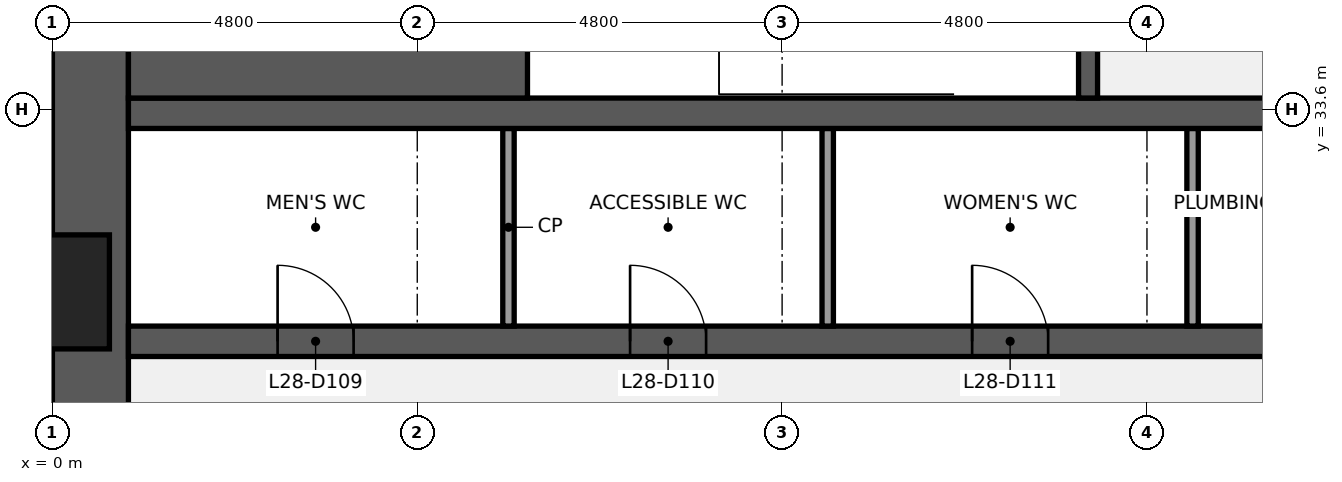
"""IFC4 building model, lengths in metres.
Left out: names, types, materials, properties, quantities, classifications, styles, units other than length and angle.
Written with IfcOpenShell. Run it as: python <this file> out.ifc"""

import sys

from ifc_helpers import new_model, si_unit, direction, frame, frame_2d, origin, place, context, subcontext, project, spatial, rectangle, extrude, element, fill, save


model = new_model("IFC4")
c1 = context("Model", 3, precision=1e-05, world=origin(), true_north=direction((0.0, 1.0)))
c2 = subcontext(c1, "Body", "Model", "MODEL_VIEW")
j1 = project(units=[si_unit("LENGTHUNIT", "METRE"), si_unit("PLANEANGLEUNIT", "RADIAN")], contexts=[c1])
p1 = place(None, origin())
s1 = spatial("IfcSite", under=j1, at=p1, CompositionType="ELEMENT")
p2 = place(p1, origin())
s2 = spatial("IfcBuilding", under=s1, at=p2, CompositionType="ELEMENT")
p3 = place(p2, frame((0.0, 0.0, 132.1)))
s3 = spatial("IfcBuildingStorey", under=s2, at=p3, CompositionType="ELEMENT", Elevation=132.1)
p4 = place(p3, frame((0.5, 9.6, 0.0), z_axis=(0.0, 0.0, 1.0), x_axis=(0.0, 1.0, 0.0)))
e1 = element("IfcWall", 1, at=p4, inside=s3, PredefinedType="SHEAR", context=c2, shape_type="SweptSolid", body=[
    extrude(rectangle(XDim=28.8, YDim=1.0, at=frame_2d((14.4, 0.0))), origin(), (0.0, 0.0, 1.0), 3.84),
])
p5 = place(p4, frame((8.85, 0.0, 0.9)))
e2 = element("IfcOpeningElement", 2, at=p5, cuts=e1, PredefinedType="OPENING", context=c2, shape_type="SweptSolid", body=[
    extrude(rectangle(XDim=1.5, YDim=1.5, at=frame_2d((0.75, 0.75))), frame((0.0, 0.51, 0.0), z_axis=(0.0, -1.0, 0.0), x_axis=(1.0, 0.0, 0.0)), (0.0, 0.0, 1.0), 1.02),
])
p6 = place(p4, frame((18.45, 0.0, 0.9)))
e3 = element("IfcOpeningElement", 3, at=p6, cuts=e1, PredefinedType="OPENING", context=c2, shape_type="SweptSolid", body=[
    extrude(rectangle(XDim=1.5, YDim=1.5, at=frame_2d((0.75, 0.75))), frame((0.0, 0.51, 0.0), z_axis=(0.0, -1.0, 0.0), x_axis=(1.0, 0.0, 0.0)), (0.0, 0.0, 1.0), 1.02),
])
p7 = place(p3, frame((1.0, 30.55, 0.0), z_axis=(0.0, 0.0, 1.0), x_axis=(1.0, 0.0, 0.0)))
e4 = element("IfcWall", 4, at=p7, inside=s3, PredefinedType="SHEAR", context=c2, shape_type="SweptSolid", body=[
    extrude(rectangle(XDim=17.2, YDim=0.4, at=frame_2d((8.6, 0.0))), origin(), (0.0, 0.0, 1.0), 3.84),
])
p8 = place(p7, frame((1.962, 0.0, 0.0)))
e5 = element("IfcOpeningElement", 5, at=p8, cuts=e4, PredefinedType="OPENING", context=c2, shape_type="SweptSolid", body=[
    extrude(rectangle(XDim=1.0, YDim=2.1, at=frame_2d((0.5, 1.05))), frame((0.0, 0.21, 0.0), z_axis=(0.0, -1.0, 0.0), x_axis=(1.0, 0.0, 0.0)), (0.0, 0.0, 1.0), 0.42),
])
p9 = place(p7, frame((6.6, 0.0, 0.0)))
e6 = element("IfcOpeningElement", 6, at=p9, cuts=e4, PredefinedType="OPENING", context=c2, shape_type="SweptSolid", body=[
    extrude(rectangle(XDim=1.0, YDim=2.1, at=frame_2d((0.5, 1.05))), frame((0.0, 0.21, 0.0), z_axis=(0.0, -1.0, 0.0), x_axis=(1.0, 0.0, 0.0)), (0.0, 0.0, 1.0), 0.42),
])
p10 = place(p7, frame((11.1, 0.0, 0.0)))
e7 = element("IfcOpeningElement", 7, at=p10, cuts=e4, PredefinedType="OPENING", context=c2, shape_type="SweptSolid", body=[
    extrude(rectangle(XDim=1.0, YDim=2.1, at=frame_2d((0.5, 1.05))), frame((0.0, 0.21, 0.0), z_axis=(0.0, -1.0, 0.0), x_axis=(1.0, 0.0, 0.0)), (0.0, 0.0, 1.0), 0.42),
])
p11 = place(p7, frame((15.137, 0.0, 0.0)))
e8 = element("IfcOpeningElement", 8, at=p11, cuts=e4, PredefinedType="OPENING", context=c2, shape_type="SweptSolid", body=[
    extrude(rectangle(XDim=1.0, YDim=2.1, at=frame_2d((0.5, 1.05))), frame((0.0, 0.21, 0.0), z_axis=(0.0, -1.0, 0.0), x_axis=(1.0, 0.0, 0.0)), (0.0, 0.0, 1.0), 0.42),
])
for number, where, z_axis, x_axis in (
    (9, (6.0, 30.75, 0.0), (0.0, 0.0, 1.0), (0.0, 1.0, 0.0)),
    (10, (10.2, 30.75, 0.0), (0.0, 0.0, 1.0), (0.0, 1.0, 0.0)),
    (11, (15.0, 30.75, 0.0), (0.0, 0.0, 1.0), (0.0, 1.0, 0.0)),
):
    element("IfcWall", number, at=place(p3, frame(where, z_axis=z_axis, x_axis=x_axis)), inside=s3, PredefinedType="PARTITIONING", context=c2, shape_type="SweptSolid", body=[
        extrude(rectangle(XDim=2.6, YDim=0.15, at=frame_2d((1.3, 0.0))), origin(), (0.0, 0.0, 1.0), 3.84),
    ])
p12 = place(p3, frame((1.0, 33.55, 0.0), z_axis=(0.0, 0.0, 1.0), x_axis=(1.0, 0.0, 0.0)))
e12 = element("IfcWall", 12, at=p12, inside=s3, PredefinedType="SHEAR", context=c2, shape_type="SweptSolid", body=[
    extrude(rectangle(XDim=17.2, YDim=0.4, at=frame_2d((8.6, 0.0))), origin(), (0.0, 0.0, 1.0), 3.84),
])
p13 = place(p3, frame((1.0, 35.575, 0.0), z_axis=(0.0, 0.0, 1.0), x_axis=(1.0, 0.0, 0.0)))
e13 = element("IfcWall", 13, at=p13, inside=s3, PredefinedType="SHEAR", context=c2, shape_type="SweptSolid", body=[
    extrude(rectangle(XDim=5.25, YDim=3.65, at=frame_2d((2.625, 0.0))), origin(), (0.0, 0.0, 1.0), 3.84),
])
p14 = place(p3, frame((13.625, 33.75, 0.0), z_axis=(0.0, 0.0, 1.0), x_axis=(0.0, 1.0, 0.0)))
e14 = element("IfcWall", 14, at=p14, inside=s3, PredefinedType="SHEAR", context=c2, shape_type="SweptSolid", body=[
    extrude(rectangle(XDim=3.45, YDim=0.25, at=frame_2d((1.725, 0.0))), origin(), (0.0, 0.0, 1.0), 3.84),
])
p15 = place(p14, frame((1.175, 0.0, 0.0)))
e15 = element("IfcOpeningElement", 15, at=p15, cuts=e14, PredefinedType="OPENING", context=c2, shape_type="SweptSolid", body=[
    extrude(rectangle(XDim=1.1, YDim=2.1, at=frame_2d((0.55, 1.05))), frame((0.0, 0.135, 0.0), z_axis=(0.0, -1.0, 0.0), x_axis=(1.0, 0.0, 0.0)), (0.0, 0.0, 1.0), 0.27),
])
p16 = place(p8, origin())
e16 = element("IfcDoor", 16, at=p16, inside=s3, OperationType="SINGLE_SWING_LEFT", PredefinedType="DOOR", context=c2, shape_type="SweptSolid", body=[
    extrude(rectangle(XDim=1.0, YDim=2.1, at=frame_2d((0.5, 1.05))), frame((0.0, 0.025, 0.0), z_axis=(0.0, -1.0, 0.0), x_axis=(1.0, 0.0, 0.0)), (0.0, 0.0, 1.0), 0.05),
])
fill(e5, e16)
p17 = place(p9, origin())
e17 = element("IfcDoor", 17, at=p17, inside=s3, OperationType="SINGLE_SWING_LEFT", PredefinedType="DOOR", context=c2, shape_type="SweptSolid", body=[
    extrude(rectangle(XDim=1.0, YDim=2.1, at=frame_2d((0.5, 1.05))), frame((0.0, 0.025, 0.0), z_axis=(0.0, -1.0, 0.0), x_axis=(1.0, 0.0, 0.0)), (0.0, 0.0, 1.0), 0.05),
])
fill(e6, e17)
p18 = place(p10, origin())
e18 = element("IfcDoor", 18, at=p18, inside=s3, OperationType="SINGLE_SWING_LEFT", PredefinedType="DOOR", context=c2, shape_type="SweptSolid", body=[
    extrude(rectangle(XDim=1.0, YDim=2.1, at=frame_2d((0.5, 1.05))), frame((0.0, 0.025, 0.0), z_axis=(0.0, -1.0, 0.0), x_axis=(1.0, 0.0, 0.0)), (0.0, 0.0, 1.0), 0.05),
])
fill(e7, e18)
save(model, sys.argv[1])
